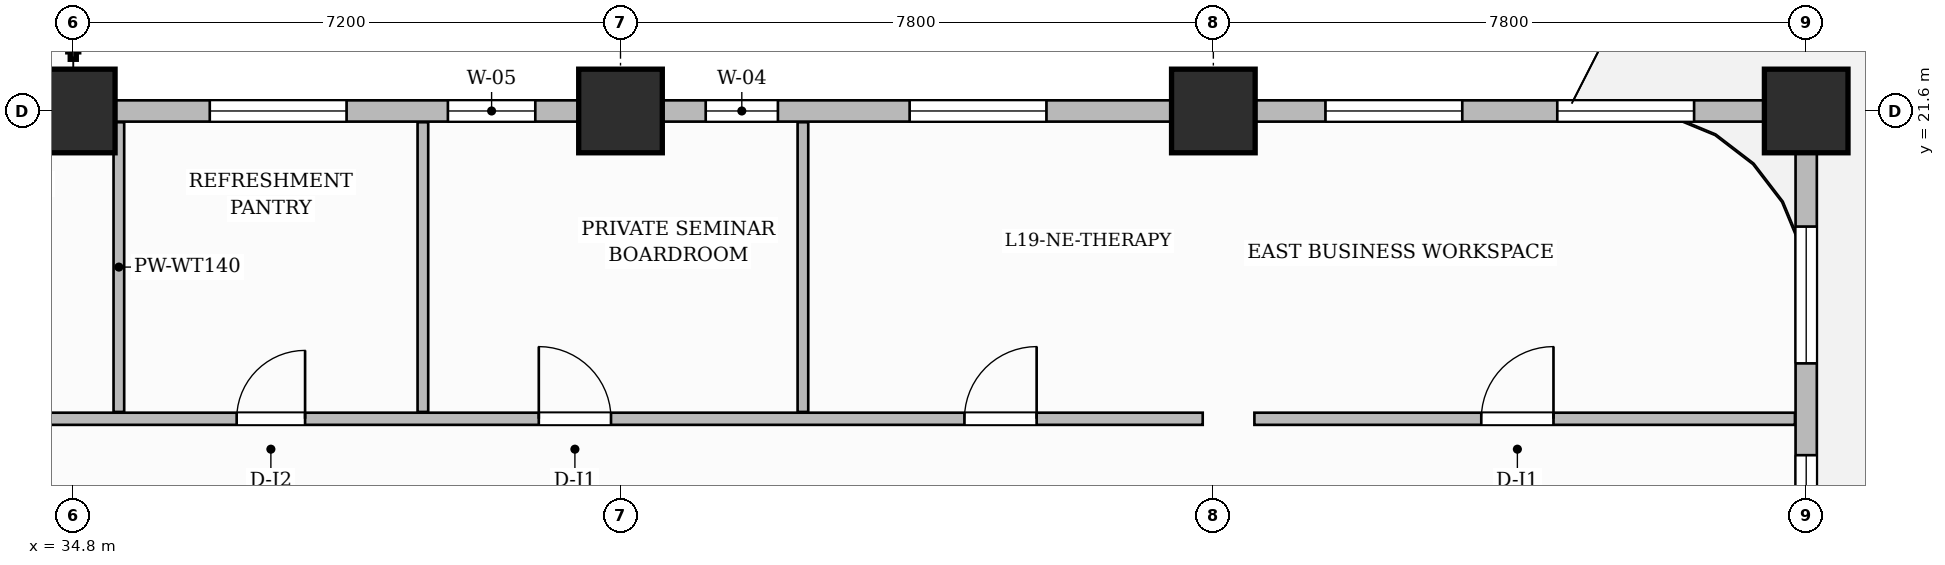
"""IFC4 building model, lengths in metres.
Left out: names, types, materials, properties, quantities, classifications, styles, units other than length and angle.
Written with IfcOpenShell. Run it as: python <this file> out.ifc"""

import sys

from ifc_helpers import new_model, si_unit, direction, frame, frame_2d, origin, origin_2d, place, context, subcontext, project, spatial, rectangle, extrude, source, transform, mapped, element, fill, save


model = new_model("IFC4")
c1 = context("Model", 3, precision=1e-05, world=origin(), true_north=direction((0.0, 1.0)))
c2 = subcontext(c1, "Body", "Model", "MODEL_VIEW")
j1 = project(units=[si_unit("LENGTHUNIT", "METRE"), si_unit("PLANEANGLEUNIT", "RADIAN")], contexts=[c1])
p1 = place(None, origin())
s1 = spatial("IfcSite", under=j1, at=p1, CompositionType="ELEMENT")
p2 = place(p1, origin())
s2 = spatial("IfcBuilding", under=s1, at=p2, CompositionType="ELEMENT")
p3 = place(p2, frame((0.0, 0.0, 80.5)))
s3 = spatial("IfcBuildingStorey", under=s2, at=p3, CompositionType="ELEMENT", Elevation=80.5)
m1 = source(origin(), c2, "Body", "SweptSolid", [
    extrude(rectangle(XDim=1.1, YDim=1.1, at=origin_2d()), origin(), (0.0, 0.0, 1.0), 3.7),
])
for number, where, z_axis, x_axis in (
    (1, (34.8, 21.6, 0.0), (0.0, 0.0, 1.0), (1.0, 0.0, 0.0)),
    (2, (42.0, 21.6, 0.0), (0.0, 0.0, 1.0), (1.0, 0.0, 0.0)),
    (3, (49.8, 21.6, 0.0), (0.0, 0.0, 1.0), (1.0, 0.0, 0.0)),
    (4, (57.6, 21.6, 0.0), (0.0, 0.0, 1.0), (1.0, 0.0, 0.0)),
):
    element("IfcColumn", number, at=place(p3, frame(where, z_axis=z_axis, x_axis=x_axis)), inside=s3, PredefinedType="COLUMN", context=c2, shape_type="MappedRepresentation", body=[
        mapped(m1, transform((0.0, 0.0, 0.0), scale=1.0)),
    ])
p4 = place(p3, frame((32.19, 17.55, 0.0), z_axis=(0.0, 0.0, 1.0), x_axis=(1.0, 0.0, 0.0)))
e5 = element("IfcWall", 5, at=p4, inside=s3, PredefinedType="PARTITIONING", context=c2, shape_type="SweptSolid", body=[
    extrude(rectangle(XDim=17.47, YDim=0.16, at=frame_2d((8.735, 0.0))), origin(), (0.0, 0.0, 1.0), 3.45),
])
p5 = place(p4, frame((1.135, 0.0, 0.0)))
e6 = element("IfcOpeningElement", 6, at=p5, cuts=e5, PredefinedType="OPENING", context=c2, shape_type="SweptSolid", body=[
    extrude(rectangle(XDim=0.85, YDim=2.1, at=frame_2d((0.425, 1.05))), frame((0.0, 0.09, 0.0), z_axis=(0.0, -1.0, 0.0), x_axis=(1.0, 0.0, 0.0)), (0.0, 0.0, 1.0), 0.18),
])
p6 = place(p4, frame((4.76, 0.0, 0.0)))
e7 = element("IfcOpeningElement", 7, at=p6, cuts=e5, PredefinedType="OPENING", context=c2, shape_type="SweptSolid", body=[
    extrude(rectangle(XDim=0.9, YDim=2.15, at=frame_2d((0.45, 1.075))), frame((0.0, 0.09, 0.0), z_axis=(0.0, -1.0, 0.0), x_axis=(1.0, 0.0, 0.0)), (0.0, 0.0, 1.0), 0.18),
])
p7 = place(p4, frame((8.735, 0.0, 0.0)))
e8 = element("IfcOpeningElement", 8, at=p7, cuts=e5, PredefinedType="OPENING", context=c2, shape_type="SweptSolid", body=[
    extrude(rectangle(XDim=0.95, YDim=2.15, at=frame_2d((0.475, 1.075))), frame((0.0, 0.09, 0.0), z_axis=(0.0, -1.0, 0.0), x_axis=(1.0, 0.0, 0.0)), (0.0, 0.0, 1.0), 0.18),
])
p8 = place(p4, frame((14.335, 0.0, 0.0)))
e9 = element("IfcOpeningElement", 9, at=p8, cuts=e5, PredefinedType="OPENING", context=c2, shape_type="SweptSolid", body=[
    extrude(rectangle(XDim=0.95, YDim=2.15, at=frame_2d((0.475, 1.075))), frame((0.0, 0.09, 0.0), z_axis=(0.0, -1.0, 0.0), x_axis=(1.0, 0.0, 0.0)), (0.0, 0.0, 1.0), 0.18),
])
p9 = place(p3, frame((50.34, 17.55, 0.0), z_axis=(0.0, 0.0, 1.0), x_axis=(1.0, 0.0, 0.0)))
e10 = element("IfcWall", 10, at=p9, inside=s3, PredefinedType="PARTITIONING", context=c2, shape_type="SweptSolid", body=[
    extrude(rectangle(XDim=7.112, YDim=0.16, at=frame_2d((3.556, 0.0))), origin(), (0.0, 0.0, 1.0), 3.45),
])
p10 = place(p9, frame((2.985, 0.0, 0.0)))
e11 = element("IfcOpeningElement", 11, at=p10, cuts=e10, PredefinedType="OPENING", context=c2, shape_type="SweptSolid", body=[
    extrude(rectangle(XDim=0.95, YDim=2.15, at=frame_2d((0.475, 1.075))), frame((0.0, 0.09, 0.0), z_axis=(0.0, -1.0, 0.0), x_axis=(1.0, 0.0, 0.0)), (0.0, 0.0, 1.0), 0.18),
])
for number, where, z_axis, x_axis in (
    (12, (35.4, 17.64, 0.0), (0.0, 0.0, 1.0), (0.0, 1.0, 0.0)),
    (13, (39.4, 17.64, 0.0), (0.0, 0.0, 1.0), (0.0, 1.0, 0.0)),
    (14, (44.4, 17.64, 0.0), (0.0, 0.0, 1.0), (0.0, 1.0, 0.0)),
):
    element("IfcWall", number, at=place(p3, frame(where, z_axis=z_axis, x_axis=x_axis)), inside=s3, PredefinedType="PARTITIONING", context=c2, shape_type="SweptSolid", body=[
        extrude(rectangle(XDim=3.812, YDim=0.14, at=frame_2d((1.906, 0.0))), origin(), (0.0, 0.0, 1.0), 3.45),
    ])
p11 = place(p3, frame((32.19, 21.5, 0.0), z_axis=(0.0, 0.0, 1.0), x_axis=(1.0, 0.0, 0.0)))
e15 = element("IfcWall", 15, at=p11, inside=s3, PredefinedType="PARTITIONING", context=c2, shape_type="SweptSolid", body=[
    extrude(rectangle(XDim=2.42, YDim=0.14, at=frame_2d((1.21, 0.0))), origin(), (0.0, 0.0, 1.0), 2.885),
])
p12 = place(p3, frame((57.6, 0.05, 0.0), z_axis=(0.0, 0.0, 1.0), x_axis=(0.0, 1.0, 0.0)))
e16 = element("IfcWall", 16, at=p12, inside=s3, PredefinedType="SOLIDWALL", context=c2, shape_type="SweptSolid", body=[
    extrude(rectangle(XDim=21.5, YDim=0.28, at=frame_2d((10.75, 0.0))), origin(), (0.0, 0.0, 1.0), 2.885),
])
p13 = place(p12, frame((2.75, 0.0, 0.0)))
e17 = element("IfcOpeningElement", 17, at=p13, cuts=e16, PredefinedType="OPENING", context=c2, shape_type="SweptSolid", body=[
    extrude(rectangle(XDim=1.2, YDim=2.2, at=frame_2d((0.6, 1.1))), frame((0.0, 0.15, 0.0), z_axis=(0.0, -1.0, 0.0), x_axis=(1.0, 0.0, 0.0)), (0.0, 0.0, 1.0), 0.3),
])
p14 = place(p12, frame((1.025, 0.0, 0.8)))
e18 = element("IfcOpeningElement", 18, at=p14, cuts=e16, PredefinedType="OPENING", context=c2, shape_type="SweptSolid", body=[
    extrude(rectangle(XDim=1.15, YDim=1.8, at=frame_2d((0.575, 0.9))), frame((0.0, 0.15, 0.0), z_axis=(0.0, -1.0, 0.0), x_axis=(1.0, 0.0, 0.0)), (0.0, 0.0, 1.0), 0.3),
])
p15 = place(p12, frame((4.654, 0.0, 0.8)))
e19 = element("IfcOpeningElement", 19, at=p15, cuts=e16, PredefinedType="OPENING", context=c2, shape_type="SweptSolid", body=[
    extrude(rectangle(XDim=1.4, YDim=1.85, at=frame_2d((0.7, 0.925))), frame((0.0, 0.15, 0.0), z_axis=(0.0, -1.0, 0.0), x_axis=(1.0, 0.0, 0.0)), (0.0, 0.0, 1.0), 0.3),
])
p16 = place(p12, frame((10.454, 0.0, 0.8)))
e20 = element("IfcOpeningElement", 20, at=p16, cuts=e16, PredefinedType="OPENING", context=c2, shape_type="SweptSolid", body=[
    extrude(rectangle(XDim=1.8, YDim=1.85, at=frame_2d((0.9, 0.925))), frame((0.0, 0.15, 0.0), z_axis=(0.0, -1.0, 0.0), x_axis=(1.0, 0.0, 0.0)), (0.0, 0.0, 1.0), 0.3),
])
p17 = place(p12, frame((15.621, 0.0, 0.8)))
e21 = element("IfcOpeningElement", 21, at=p17, cuts=e16, PredefinedType="OPENING", context=c2, shape_type="SweptSolid", body=[
    extrude(rectangle(XDim=1.4, YDim=1.85, at=frame_2d((0.7, 0.925))), frame((0.0, 0.15, 0.0), z_axis=(0.0, -1.0, 0.0), x_axis=(1.0, 0.0, 0.0)), (0.0, 0.0, 1.0), 0.3),
])
p18 = place(p12, frame((18.229, 0.0, 0.8)))
e22 = element("IfcOpeningElement", 22, at=p18, cuts=e16, PredefinedType="OPENING", context=c2, shape_type="SweptSolid", body=[
    extrude(rectangle(XDim=1.8, YDim=1.85, at=frame_2d((0.9, 0.925))), frame((0.0, 0.15, 0.0), z_axis=(0.0, -1.0, 0.0), x_axis=(1.0, 0.0, 0.0)), (0.0, 0.0, 1.0), 0.3),
])
p19 = place(p3, frame((34.8, 21.6, 0.0), z_axis=(0.0, 0.0, 1.0), x_axis=(1.0, 0.0, 0.0)))
e23 = element("IfcWall", 23, at=p19, inside=s3, PredefinedType="SOLIDWALL", context=c2, shape_type="SweptSolid", body=[
    extrude(rectangle(XDim=22.8, YDim=0.28, at=frame_2d((11.4, 0.0))), origin(), (0.0, 0.0, 1.0), 2.885),
])
p20 = place(p19, frame((1.796, 0.0, 0.8)))
e24 = element("IfcOpeningElement", 24, at=p20, cuts=e23, PredefinedType="OPENING", context=c2, shape_type="SweptSolid", body=[
    extrude(rectangle(XDim=1.8, YDim=1.85, at=frame_2d((0.9, 0.925))), frame((0.0, 0.15, 0.0), z_axis=(0.0, -1.0, 0.0), x_axis=(1.0, 0.0, 0.0)), (0.0, 0.0, 1.0), 0.3),
])
p21 = place(p19, frame((4.929, 0.0, 0.8)))
e25 = element("IfcOpeningElement", 25, at=p21, cuts=e23, PredefinedType="OPENING", context=c2, shape_type="SweptSolid", body=[
    extrude(rectangle(XDim=1.15, YDim=1.8, at=frame_2d((0.575, 0.9))), frame((0.0, 0.15, 0.0), z_axis=(0.0, -1.0, 0.0), x_axis=(1.0, 0.0, 0.0)), (0.0, 0.0, 1.0), 0.3),
])
p22 = place(p19, frame((8.321, 0.0, 0.8)))
e26 = element("IfcOpeningElement", 26, at=p22, cuts=e23, PredefinedType="OPENING", context=c2, shape_type="SweptSolid", body=[
    extrude(rectangle(XDim=0.95, YDim=1.75, at=frame_2d((0.475, 0.875))), frame((0.0, 0.15, 0.0), z_axis=(0.0, -1.0, 0.0), x_axis=(1.0, 0.0, 0.0)), (0.0, 0.0, 1.0), 0.3),
])
p23 = place(p19, frame((11.004, 0.0, 0.8)))
e27 = element("IfcOpeningElement", 27, at=p23, cuts=e23, PredefinedType="OPENING", context=c2, shape_type="SweptSolid", body=[
    extrude(rectangle(XDim=1.8, YDim=1.85, at=frame_2d((0.9, 0.925))), frame((0.0, 0.15, 0.0), z_axis=(0.0, -1.0, 0.0), x_axis=(1.0, 0.0, 0.0)), (0.0, 0.0, 1.0), 0.3),
])
p24 = place(p19, frame((16.475, 0.0, 0.8)))
e28 = element("IfcOpeningElement", 28, at=p24, cuts=e23, PredefinedType="OPENING", context=c2, shape_type="SweptSolid", body=[
    extrude(rectangle(XDim=1.8, YDim=1.85, at=frame_2d((0.9, 0.925))), frame((0.0, 0.15, 0.0), z_axis=(0.0, -1.0, 0.0), x_axis=(1.0, 0.0, 0.0)), (0.0, 0.0, 1.0), 0.3),
])
p25 = place(p19, frame((19.525, 0.0, 0.8)))
e29 = element("IfcOpeningElement", 29, at=p25, cuts=e23, PredefinedType="OPENING", context=c2, shape_type="SweptSolid", body=[
    extrude(rectangle(XDim=1.8, YDim=1.85, at=frame_2d((0.9, 0.925))), frame((0.0, 0.15, 0.0), z_axis=(0.0, -1.0, 0.0), x_axis=(1.0, 0.0, 0.0)), (0.0, 0.0, 1.0), 0.3),
])
m2 = source(origin(), c2, "Body", "SweptSolid", [
    extrude(rectangle(XDim=0.95, YDim=2.15, at=frame_2d((0.475, 1.075))), frame((0.0, 0.025, 0.0), z_axis=(0.0, -1.0, 0.0), x_axis=(1.0, 0.0, 0.0)), (0.0, 0.0, 1.0), 0.05),
])
p26 = place(p10, origin())
e30 = element("IfcDoor", 30, at=p26, inside=s3, OperationType="SINGLE_SWING_RIGHT", PredefinedType="DOOR", context=c2, shape_type="MappedRepresentation", body=[
    mapped(m2, transform((0.0, 0.0, 0.0), scale=1.0)),
])
fill(e11, e30)
m3 = source(origin(), c2, "Body", "SweptSolid", [
    extrude(rectangle(XDim=0.9, YDim=2.15, at=frame_2d((0.45, 1.075))), frame((0.0, 0.025, 0.0), z_axis=(0.0, -1.0, 0.0), x_axis=(1.0, 0.0, 0.0)), (0.0, 0.0, 1.0), 0.05),
])
p27 = place(p6, origin())
e31 = element("IfcDoor", 31, at=p27, inside=s3, OperationType="SINGLE_SWING_RIGHT", PredefinedType="DOOR", context=c2, shape_type="MappedRepresentation", body=[
    mapped(m3, transform((0.0, 0.0, 0.0), scale=1.0)),
])
fill(e7, e31)
p28 = place(p7, origin())
e32 = element("IfcDoor", 32, at=p28, inside=s3, OperationType="SINGLE_SWING_LEFT", PredefinedType="DOOR", context=c2, shape_type="MappedRepresentation", body=[
    mapped(m2, transform((0.0, 0.0, 0.0), scale=1.0)),
])
fill(e8, e32)
p29 = place(p8, origin())
e33 = element("IfcDoor", 33, at=p29, inside=s3, OperationType="SINGLE_SWING_RIGHT", PredefinedType="DOOR", context=c2, shape_type="MappedRepresentation", body=[
    mapped(m2, transform((0.0, 0.0, 0.0), scale=1.0)),
])
fill(e9, e33)
m4 = source(origin(), c2, "Body", "SweptSolid", [
    extrude(rectangle(XDim=1.4, YDim=1.85, at=frame_2d((0.7, 0.925))), frame((0.0, 0.03, 0.0), z_axis=(0.0, -1.0, 0.0), x_axis=(1.0, 0.0, 0.0)), (0.0, 0.0, 1.0), 0.06),
])
p30 = place(p17, origin())
e34 = element("IfcWindow", 34, at=p30, inside=s3, PartitioningType="SINGLE_PANEL", PredefinedType="WINDOW", context=c2, shape_type="MappedRepresentation", body=[
    mapped(m4, transform((0.0, 0.0, 0.0), scale=1.0)),
])
fill(e21, e34)
m5 = source(origin(), c2, "Body", "SweptSolid", [
    extrude(rectangle(XDim=1.8, YDim=1.85, at=frame_2d((0.9, 0.925))), frame((0.0, 0.03, 0.0), z_axis=(0.0, -1.0, 0.0), x_axis=(1.0, 0.0, 0.0)), (0.0, 0.0, 1.0), 0.06),
])
p31 = place(p18, origin())
e35 = element("IfcWindow", 35, at=p31, inside=s3, PartitioningType="DOUBLE_PANEL_VERTICAL", PredefinedType="WINDOW", context=c2, shape_type="MappedRepresentation", body=[
    mapped(m5, transform((0.0, 0.0, 0.0), scale=1.0)),
])
fill(e22, e35)
p32 = place(p20, origin())
e36 = element("IfcWindow", 36, at=p32, inside=s3, PartitioningType="DOUBLE_PANEL_VERTICAL", PredefinedType="WINDOW", context=c2, shape_type="MappedRepresentation", body=[
    mapped(m5, transform((0.0, 0.0, 0.0), scale=1.0)),
])
fill(e24, e36)
m6 = source(origin(), c2, "Body", "SweptSolid", [
    extrude(rectangle(XDim=1.15, YDim=1.8, at=frame_2d((0.575, 0.9))), frame((0.0, 0.03, 0.0), z_axis=(0.0, -1.0, 0.0), x_axis=(1.0, 0.0, 0.0)), (0.0, 0.0, 1.0), 0.06),
])
p33 = place(p21, origin())
e37 = element("IfcWindow", 37, at=p33, inside=s3, PartitioningType="SINGLE_PANEL", PredefinedType="WINDOW", context=c2, shape_type="MappedRepresentation", body=[
    mapped(m6, transform((0.0, 0.0, 0.0), scale=1.0)),
])
fill(e25, e37)
m7 = source(origin(), c2, "Body", "SweptSolid", [
    extrude(rectangle(XDim=0.95, YDim=1.75, at=frame_2d((0.475, 0.875))), frame((0.0, 0.03, 0.0), z_axis=(0.0, -1.0, 0.0), x_axis=(1.0, 0.0, 0.0)), (0.0, 0.0, 1.0), 0.06),
])
p34 = place(p22, origin())
e38 = element("IfcWindow", 38, at=p34, inside=s3, PartitioningType="SINGLE_PANEL", PredefinedType="WINDOW", context=c2, shape_type="MappedRepresentation", body=[
    mapped(m7, transform((0.0, 0.0, 0.0), scale=1.0)),
])
fill(e26, e38)
p35 = place(p23, origin())
e39 = element("IfcWindow", 39, at=p35, inside=s3, PartitioningType="DOUBLE_PANEL_VERTICAL", PredefinedType="WINDOW", context=c2, shape_type="MappedRepresentation", body=[
    mapped(m5, transform((0.0, 0.0, 0.0), scale=1.0)),
])
fill(e27, e39)
p36 = place(p24, origin())
e40 = element("IfcWindow", 40, at=p36, inside=s3, PartitioningType="DOUBLE_PANEL_VERTICAL", PredefinedType="WINDOW", context=c2, shape_type="MappedRepresentation", body=[
    mapped(m5, transform((0.0, 0.0, 0.0), scale=1.0)),
])
fill(e28, e40)
p37 = place(p25, origin())
e41 = element("IfcWindow", 41, at=p37, inside=s3, PartitioningType="DOUBLE_PANEL_VERTICAL", PredefinedType="WINDOW", context=c2, shape_type="MappedRepresentation", body=[
    mapped(m5, transform((0.0, 0.0, 0.0), scale=1.0)),
])
fill(e29, e41)
save(model, sys.argv[1])
